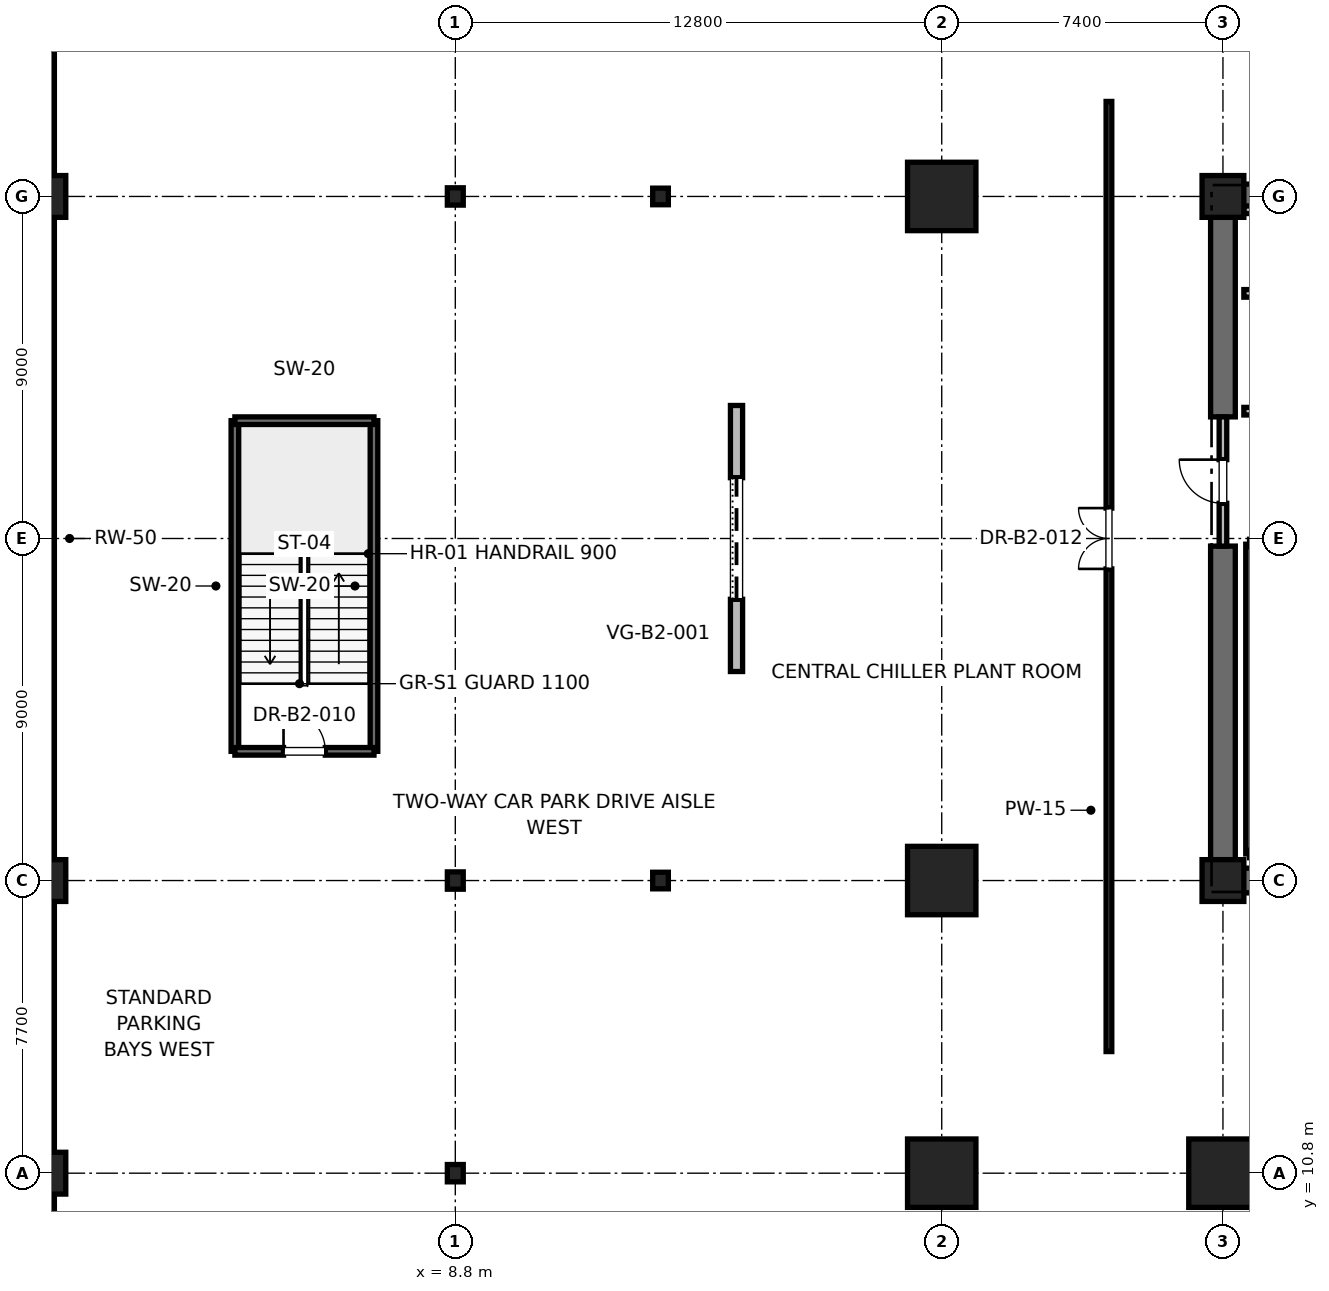
"""IFC4 building model, lengths in metres.
Left out: names, types, materials, properties, quantities, classifications, styles, units other than length and angle.
Written with IfcOpenShell. Run it as: python <this file> out.ifc"""

import sys

from ifc_helpers import new_model, si_unit, direction, frame, frame_2d, origin, origin_2d, place, context, subcontext, project, spatial, rectangle, i_section, extrude, element, fill, save


model = new_model("IFC4")
c1 = context("Model", 3, precision=1e-05, world=origin(), true_north=direction((0.0, 1.0)))
c2 = subcontext(c1, "Body", "Model", "MODEL_VIEW")
j1 = project(units=[si_unit("LENGTHUNIT", "METRE"), si_unit("PLANEANGLEUNIT", "RADIAN")], contexts=[c1])
p1 = place(None, origin())
s1 = spatial("IfcSite", under=j1, at=p1, CompositionType="ELEMENT")
p2 = place(p1, origin())
s2 = spatial("IfcBuilding", under=s1, at=p2, CompositionType="ELEMENT")
p3 = place(p2, frame((0.0, 0.0, -9.0)))
s3 = spatial("IfcBuildingStorey", under=s2, at=p3, CompositionType="ELEMENT", Elevation=-9.0)
for number, where, z_axis, x_axis in (
    (1, (29.0, 10.8, -0.3), (0.0, 0.0, 1.0), (1.0, 0.0, 0.0)),
    (2, (21.6, 18.5, -0.3), (0.0, 0.0, 1.0), (1.0, 0.0, 0.0)),
    (3, (21.6, 36.5, -0.3), (0.0, 0.0, 1.0), (1.0, 0.0, 0.0)),
    (4, (21.6, 10.8, -0.3), (0.0, 0.0, 1.0), (1.0, 0.0, 0.0)),
):
    element("IfcColumn", number, at=place(p3, frame(where, z_axis=z_axis, x_axis=x_axis)), inside=s3, PredefinedType="COLUMN", context=c2, shape_type="SweptSolid", body=[
        extrude(rectangle(XDim=1.8, YDim=1.8, at=origin_2d()), origin(), (0.0, 0.0, 1.0), 4.8),
    ])
for number, where, z_axis, x_axis in (
    (5, (14.2, 18.5, -0.3), (0.0, 0.0, 1.0), (1.0, 0.0, 0.0)),
    (6, (14.2, 36.5, -0.3), (0.0, 0.0, 1.0), (1.0, 0.0, 0.0)),
):
    element("IfcColumn", number, at=place(p3, frame(where, z_axis=z_axis, x_axis=x_axis)), inside=s3, PredefinedType="COLUMN", context=c2, shape_type="SweptSolid", body=[
        extrude(i_section(OverallWidth=0.412, OverallDepth=0.437, WebThickness=0.036, FlangeThickness=0.058, FilletRadius=0.015, at=origin_2d()), origin(), (0.0, 0.0, 1.0), 4.8),
    ])
for number, where, z_axis, x_axis in (
    (7, (29.0, 18.5, -0.3), (0.0, 0.0, 1.0), (1.0, 0.0, 0.0)),
    (8, (29.0, 36.5, -0.3), (0.0, 0.0, 1.0), (1.0, 0.0, 0.0)),
):
    element("IfcColumn", number, at=place(p3, frame(where, z_axis=z_axis, x_axis=x_axis)), inside=s3, PredefinedType="PILASTER", context=c2, shape_type="SweptSolid", body=[
        extrude(rectangle(XDim=1.1, YDim=1.1, at=origin_2d()), origin(), (0.0, 0.0, 1.0), 4.8),
    ])
for number, where, z_axis, x_axis in (
    (9, (-2.0, 10.8, -0.3), (0.0, 0.0, 1.0), (1.0, 0.0, 0.0)),
    (10, (-2.0, 18.5, -0.3), (0.0, 0.0, 1.0), (1.0, 0.0, 0.0)),
    (11, (-2.0, 36.5, -0.3), (0.0, 0.0, 1.0), (1.0, 0.0, 0.0)),
):
    element("IfcColumn", number, at=place(p3, frame(where, z_axis=z_axis, x_axis=x_axis)), inside=s3, PredefinedType="COLUMN", context=c2, shape_type="SweptSolid", body=[
        extrude(rectangle(XDim=1.1, YDim=1.1, at=origin_2d()), origin(), (0.0, 0.0, 1.0), 4.8),
    ])
for number, where, z_axis, x_axis in (
    (12, (8.8, 10.8, -0.3), (0.0, 0.0, 1.0), (1.0, 0.0, 0.0)),
    (13, (8.8, 18.5, -0.3), (0.0, 0.0, 1.0), (1.0, 0.0, 0.0)),
    (14, (8.8, 36.5, -0.3), (0.0, 0.0, 1.0), (1.0, 0.0, 0.0)),
):
    element("IfcColumn", number, at=place(p3, frame(where, z_axis=z_axis, x_axis=x_axis)), inside=s3, PredefinedType="COLUMN", context=c2, shape_type="SweptSolid", body=[
        extrude(i_section(OverallWidth=0.418, OverallDepth=0.456, WebThickness=0.042, FlangeThickness=0.067, FilletRadius=0.015, at=origin_2d()), origin(), (0.0, 0.0, 1.0), 4.8),
    ])
p4 = place(p3, frame((29.0, 18.5, -0.3), z_axis=(0.0, 0.0, 1.0), x_axis=(1.0, 0.0, 0.0)))
e15 = element("IfcWall", 15, at=p4, inside=s3, PredefinedType="SHEAR", context=c2, shape_type="SweptSolid", body=[
    extrude(rectangle(XDim=9.2, YDim=0.65, at=frame_2d((4.6, 0.0))), origin(), (0.0, 0.0, 1.0), 4.5),
])
p5 = place(p3, frame((29.0, 36.5, -0.3), z_axis=(0.0, 0.0, 1.0), x_axis=(1.0, 0.0, 0.0)))
e16 = element("IfcWall", 16, at=p5, inside=s3, PredefinedType="SHEAR", context=c2, shape_type="SweptSolid", body=[
    extrude(rectangle(XDim=5.8, YDim=0.65, at=frame_2d((2.9, 0.0))), origin(), (0.0, 0.0, 1.0), 4.5),
])
p6 = place(p3, frame((29.0, 18.5, -0.3), z_axis=(0.0, 0.0, 1.0), x_axis=(0.0, 1.0, 0.0)))
e17 = element("IfcWall", 17, at=p6, inside=s3, PredefinedType="SHEAR", context=c2, shape_type="SweptSolid", body=[
    extrude(rectangle(XDim=8.8, YDim=0.65, at=frame_2d((4.4, 0.0))), origin(), (0.0, 0.0, 1.0), 4.5),
])
p7 = place(p3, frame((29.0, 30.7, -0.3), z_axis=(0.0, 0.0, 1.0), x_axis=(0.0, 1.0, 0.0)))
e18 = element("IfcWall", 18, at=p7, inside=s3, PredefinedType="SHEAR", context=c2, shape_type="SweptSolid", body=[
    extrude(rectangle(XDim=5.8, YDim=0.65, at=frame_2d((2.9, 0.0))), origin(), (0.0, 0.0, 1.0), 4.5),
])
p8 = place(p3, frame((-2.0, 56.5, -0.3), z_axis=(0.0, 0.0, 1.0), x_axis=(0.0, -1.0, 0.0)))
e19 = element("IfcWall", 19, at=p8, inside=s3, PredefinedType="USERDEFINED", context=c2, shape_type="SweptSolid", body=[
    extrude(rectangle(XDim=58.0, YDim=0.5, at=frame_2d((29.0, 0.0))), origin(), (0.0, 0.0, 1.0), 3.68),
])
p9 = place(p3, frame((16.2, 24.0, 0.0), z_axis=(0.0, 0.0, 1.0), x_axis=(0.0, 1.0, 0.0)))
e20 = element("IfcWall", 20, at=p9, inside=s3, PredefinedType="SOLIDWALL", context=c2, shape_type="SweptSolid", body=[
    extrude(rectangle(XDim=7.0, YDim=0.32, at=frame_2d((3.5, 0.0))), origin(), (0.0, 0.0, 1.0), 4.2),
])
p10 = place(p9, frame((1.9, 0.0, 0.0)))
e21 = element("IfcOpeningElement", 21, at=p10, cuts=e20, PredefinedType="OPENING", context=c2, shape_type="SweptSolid", body=[
    extrude(rectangle(XDim=3.2, YDim=2.8, at=frame_2d((1.6, 1.4))), frame((0.0, 0.16, 0.0), z_axis=(0.0, -1.0, 0.0), x_axis=(1.0, 0.0, 0.0)), (0.0, 0.0, 1.0), 0.32),
])
p11 = place(p3, frame((29.7, 19.2, -0.3), z_axis=(0.0, 0.0, 1.0), x_axis=(0.0, 1.0, 0.0)))
e22 = element("IfcWall", 22, at=p11, inside=s3, PredefinedType="SOLIDWALL", context=c2, shape_type="SweptSolid", body=[
    extrude(rectangle(XDim=8.15, YDim=0.2, at=frame_2d((4.075, 0.0))), origin(), (0.0, 0.0, 1.0), 4.5),
])
for number, where, z_axis, x_axis in (
    (23, (3.0, 21.9, -0.3), (0.0, 0.0, 1.0), (0.0, 1.0, 0.0)),
    (24, (6.66, 21.9, -0.3), (0.0, 0.0, 1.0), (0.0, 1.0, 0.0)),
):
    element("IfcWall", number, at=place(p3, frame(where, z_axis=z_axis, x_axis=x_axis)), inside=s3, PredefinedType="SOLIDWALL", context=c2, shape_type="SweptSolid", body=[
        extrude(rectangle(XDim=8.7, YDim=0.2, at=frame_2d((4.35, 0.0))), origin(), (0.0, 0.0, 1.0), 4.5),
    ])
p12 = place(p3, frame((3.0, 30.6, -0.3), z_axis=(0.0, 0.0, 1.0), x_axis=(1.0, 0.0, 0.0)))
e25 = element("IfcWall", 25, at=p12, inside=s3, PredefinedType="SOLIDWALL", context=c2, shape_type="SweptSolid", body=[
    extrude(rectangle(XDim=3.66, YDim=0.2, at=frame_2d((1.83, 0.0))), origin(), (0.0, 0.0, 1.0), 4.5),
])
p13 = place(p3, frame((3.0, 21.9, -0.3), z_axis=(0.0, 0.0, 1.0), x_axis=(1.0, 0.0, 0.0)))
e26 = element("IfcWall", 26, at=p13, inside=s3, PredefinedType="SOLIDWALL", context=c2, shape_type="SweptSolid", body=[
    extrude(rectangle(XDim=3.66, YDim=0.2, at=frame_2d((1.83, 0.0))), origin(), (0.0, 0.0, 1.0), 4.5),
])
p14 = place(p13, frame((1.28, 0.0, 0.3)))
e27 = element("IfcOpeningElement", 27, at=p14, cuts=e26, PredefinedType="OPENING", context=c2, shape_type="SweptSolid", body=[
    extrude(rectangle(XDim=1.1, YDim=2.15, at=frame_2d((0.55, 1.075))), frame((0.0, 0.1, 0.0), z_axis=(0.0, -1.0, 0.0), x_axis=(1.0, 0.0, 0.0)), (0.0, 0.0, 1.0), 0.2),
])
p15 = place(p3, frame((29.0, 27.3, 0.0), z_axis=(0.0, 0.0, 1.0), x_axis=(0.0, 1.0, 0.0)))
e28 = element("IfcWall", 28, at=p15, inside=s3, PredefinedType="PARTITIONING", context=c2, shape_type="SweptSolid", body=[
    extrude(rectangle(XDim=3.4, YDim=0.2, at=frame_2d((1.7, 0.0))), origin(), (0.0, 0.0, 1.0), 2.98),
])
p16 = place(p15, frame((1.125, 0.0, 0.0)))
e29 = element("IfcOpeningElement", 29, at=p16, cuts=e28, PredefinedType="OPENING", context=c2, shape_type="SweptSolid", body=[
    extrude(rectangle(XDim=1.15, YDim=2.2, at=frame_2d((0.575, 1.1))), frame((0.0, 0.1, 0.0), z_axis=(0.0, -1.0, 0.0), x_axis=(1.0, 0.0, 0.0)), (0.0, 0.0, 1.0), 0.2),
])
p17 = place(p3, frame((29.55, 30.85, 0.0), z_axis=(0.0, 0.0, 1.0), x_axis=(1.0, 0.0, 0.0)))
e30 = element("IfcWall", 30, at=p17, inside=s3, PredefinedType="SOLIDWALL", context=c2, shape_type="SweptSolid", body=[
    extrude(rectangle(XDim=2.6, YDim=0.2, at=frame_2d((1.3, 0.0))), origin(), (0.0, 0.0, 1.0), 2.98),
])
p18 = place(p17, frame((0.75, 0.0, 0.0)))
e31 = element("IfcOpeningElement", 31, at=p18, cuts=e30, PredefinedType="OPENING", context=c2, shape_type="SweptSolid", body=[
    extrude(rectangle(XDim=1.1, YDim=2.2, at=frame_2d((0.55, 1.1))), frame((0.0, 0.1, 0.0), z_axis=(0.0, -1.0, 0.0), x_axis=(1.0, 0.0, 0.0)), (0.0, 0.0, 1.0), 0.2),
])
p19 = place(p3, frame((29.55, 33.95, 0.0), z_axis=(0.0, 0.0, 1.0), x_axis=(1.0, 0.0, 0.0)))
e32 = element("IfcWall", 32, at=p19, inside=s3, PredefinedType="SOLIDWALL", context=c2, shape_type="SweptSolid", body=[
    extrude(rectangle(XDim=2.8, YDim=0.2, at=frame_2d((1.4, 0.0))), origin(), (0.0, 0.0, 1.0), 4.2),
])
p20 = place(p3, frame((32.35, 36.15, 0.0), z_axis=(0.0, 0.0, 1.0), x_axis=(-1.0, 0.0, 0.0)))
e33 = element("IfcWall", 33, at=p20, inside=s3, PredefinedType="SOLIDWALL", context=c2, shape_type="SweptSolid", body=[
    extrude(rectangle(XDim=2.8, YDim=0.2, at=frame_2d((1.4, 0.0))), origin(), (0.0, 0.0, 1.0), 3.38),
])
p21 = place(p3, frame((26.0, 14.0, 0.0), z_axis=(0.0, 0.0, 1.0), x_axis=(0.0, 1.0, 0.0)))
e34 = element("IfcWall", 34, at=p21, inside=s3, PredefinedType="PARTITIONING", context=c2, shape_type="SweptSolid", body=[
    extrude(rectangle(XDim=25.0, YDim=0.15, at=frame_2d((12.5, 0.0))), origin(), (0.0, 0.0, 1.0), 2.85),
])
p22 = place(p21, frame((12.7, 0.0, 0.0)))
e35 = element("IfcOpeningElement", 35, at=p22, cuts=e34, PredefinedType="OPENING", context=c2, shape_type="SweptSolid", body=[
    extrude(rectangle(XDim=1.6, YDim=2.25, at=frame_2d((0.8, 1.125))), frame((0.0, 0.075, 0.0), z_axis=(0.0, -1.0, 0.0), x_axis=(1.0, 0.0, 0.0)), (0.0, 0.0, 1.0), 0.15),
])
p23 = place(p10, origin())
e36 = element("IfcDoor", 36, at=p23, inside=s3, OperationType="ROLLINGUP", PredefinedType="GATE", context=c2, shape_type="SweptSolid", body=[
    extrude(rectangle(XDim=3.2, YDim=2.8, at=frame_2d((1.6, 1.4))), frame((0.0, 0.025, 0.0), z_axis=(0.0, -1.0, 0.0), x_axis=(1.0, 0.0, 0.0)), (0.0, 0.0, 1.0), 0.05),
])
fill(e21, e36)
p24 = place(p14, origin())
e37 = element("IfcDoor", 37, at=p24, inside=s3, OperationType="SINGLE_SWING_LEFT", PredefinedType="DOOR", context=c2, shape_type="SweptSolid", body=[
    extrude(rectangle(XDim=1.1, YDim=2.15, at=frame_2d((0.55, 1.075))), frame((0.0, 0.025, 0.0), z_axis=(0.0, -1.0, 0.0), x_axis=(1.0, 0.0, 0.0)), (0.0, 0.0, 1.0), 0.05),
])
fill(e27, e37)
p25 = place(p16, origin())
e38 = element("IfcDoor", 38, at=p25, inside=s3, OperationType="SINGLE_SWING_RIGHT", PredefinedType="DOOR", context=c2, shape_type="SweptSolid", body=[
    extrude(rectangle(XDim=1.15, YDim=2.2, at=frame_2d((0.575, 1.1))), frame((0.0, 0.025, 0.0), z_axis=(0.0, -1.0, 0.0), x_axis=(1.0, 0.0, 0.0)), (0.0, 0.0, 1.0), 0.05),
])
fill(e29, e38)
p26 = place(p22, origin())
e39 = element("IfcDoor", 39, at=p26, inside=s3, OperationType="DOUBLE_DOOR_SINGLE_SWING", PredefinedType="DOOR", context=c2, shape_type="SweptSolid", body=[
    extrude(rectangle(XDim=1.6, YDim=2.25, at=frame_2d((0.8, 1.125))), frame((0.0, 0.025, 0.0), z_axis=(0.0, -1.0, 0.0), x_axis=(1.0, 0.0, 0.0)), (0.0, 0.0, 1.0), 0.05),
])
fill(e35, e39)
save(model, sys.argv[1])
